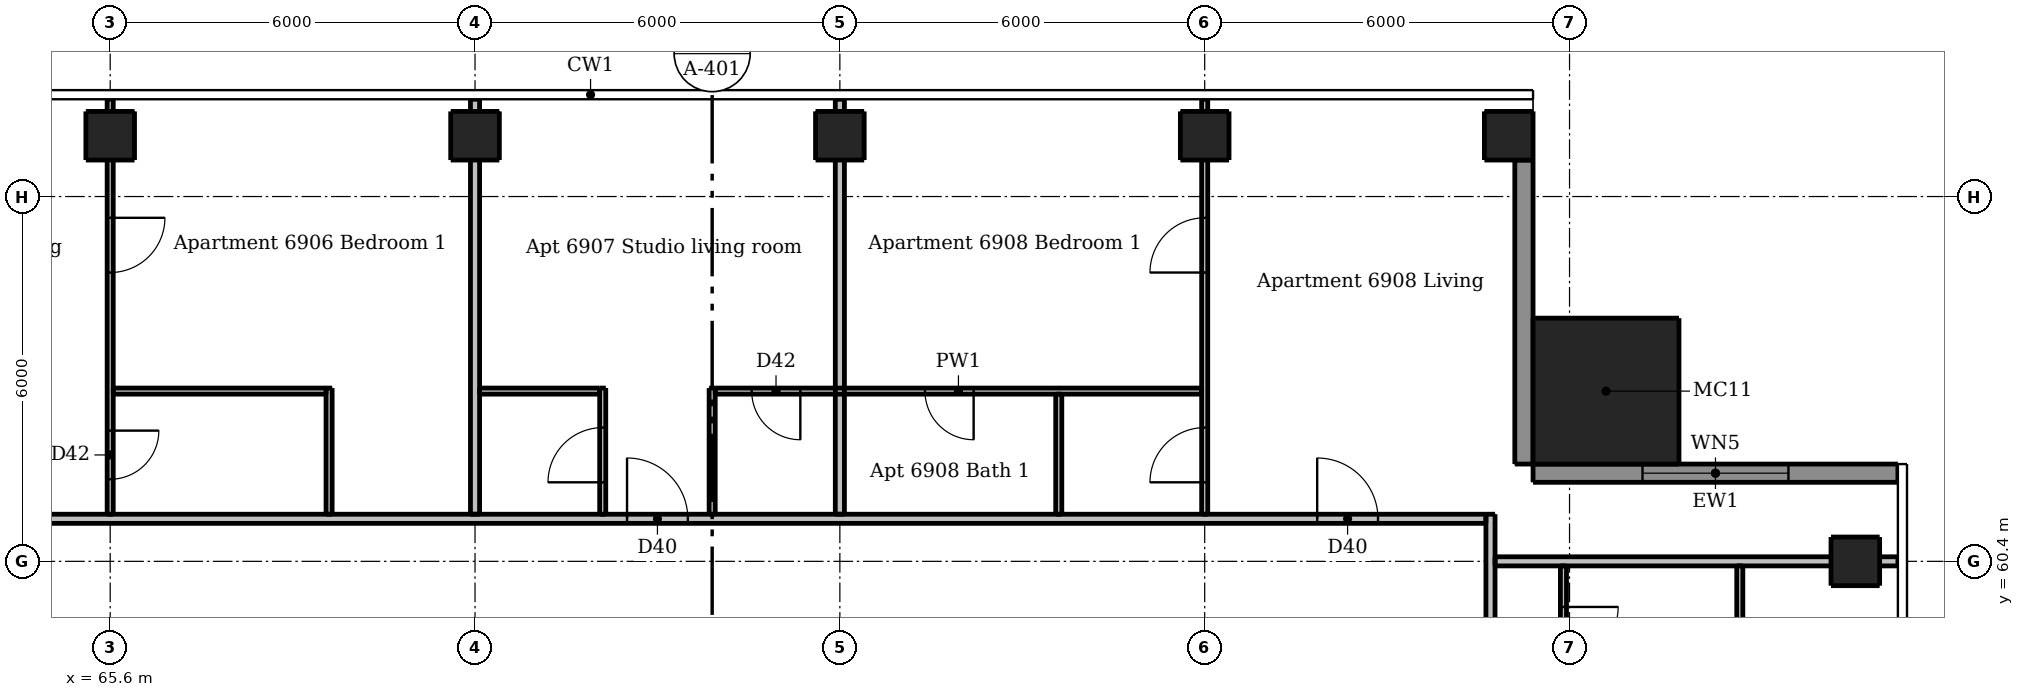
"""IFC4 building model, lengths in metres.
Left out: names, types, materials, properties, quantities, classifications, styles, units other than length and angle.
Written with IfcOpenShell. Run it as: python <this file> out.ifc"""

import sys

from ifc_helpers import new_model, si_unit, direction, frame, frame_2d, origin, origin_2d, place, context, subcontext, project, spatial, rectangle, extrude, element, fill, save


model = new_model("IFC4")
c1 = context("Model", 3, precision=1e-05, world=origin(), true_north=direction((0.0, 1.0)))
c2 = subcontext(c1, "Body", "Model", "MODEL_VIEW")
j1 = project(units=[si_unit("LENGTHUNIT", "METRE"), si_unit("PLANEANGLEUNIT", "RADIAN")], contexts=[c1])
p1 = place(None, origin())
s1 = spatial("IfcSite", under=j1, at=p1, CompositionType="ELEMENT")
p2 = place(p1, origin())
s2 = spatial("IfcBuilding", under=s1, at=p2, CompositionType="ELEMENT")
p3 = place(p2, frame((0.0, 0.0, 258.7)))
s3 = spatial("IfcBuildingStorey", under=s2, at=p3, CompositionType="ELEMENT", Elevation=258.7)
for number, where, z_axis, x_axis in (
    (1, (94.3, 60.4, 0.0), (0.0, 0.0, 1.0), (1.0, 0.0, 0.0)),
    (2, (65.6, 67.4, 0.0), (0.0, 0.0, 1.0), (1.0, 0.0, 0.0)),
    (3, (71.6, 67.4, 0.0), (0.0, 0.0, 1.0), (1.0, 0.0, 0.0)),
    (4, (77.6, 67.4, 0.0), (0.0, 0.0, 1.0), (1.0, 0.0, 0.0)),
    (5, (83.6, 67.4, 0.0), (0.0, 0.0, 1.0), (1.0, 0.0, 0.0)),
    (6, (88.6, 67.4, 0.0), (0.0, 0.0, 1.0), (1.0, 0.0, 0.0)),
):
    element("IfcColumn", number, at=place(p3, frame(where, z_axis=z_axis, x_axis=x_axis)), inside=s3, PredefinedType="COLUMN", context=c2, shape_type="SweptSolid", body=[
        extrude(rectangle(XDim=0.8, YDim=0.8, at=origin_2d()), origin(), (0.0, 0.0, 1.0), 3.05),
    ])
p4 = place(p3, frame((90.2, 63.2, 0.0), z_axis=(0.0, 0.0, 1.0), x_axis=(1.0, 0.0, 0.0)))
e7 = element("IfcColumn", 7, at=p4, inside=s3, PredefinedType="COLUMN", context=c2, shape_type="SweptSolid", body=[
    extrude(rectangle(XDim=2.4, YDim=2.4, at=origin_2d()), origin(), (0.0, 0.0, 1.0), 3.3),
])
p5 = place(p3, frame((95.0, 61.85, 0.0), z_axis=(0.0, 0.0, 1.0), x_axis=(-1.0, 0.0, 0.0)))
e8 = element("IfcWall", 8, at=p5, inside=s3, PredefinedType="SOLIDWALL", context=c2, shape_type="SweptSolid", body=[
    extrude(rectangle(XDim=6.0, YDim=0.3, at=frame_2d((3.0, 0.0))), origin(), (0.0, 0.0, 1.0), 3.05),
])
p6 = place(p5, frame((1.8, 0.0, 0.15)))
e9 = element("IfcOpeningElement", 9, at=p6, cuts=e8, PredefinedType="OPENING", context=c2, shape_type="SweptSolid", body=[
    extrude(rectangle(XDim=2.4, YDim=2.1, at=frame_2d((1.2, 1.05))), frame((0.0, 0.16, 0.0), z_axis=(0.0, -1.0, 0.0), x_axis=(1.0, 0.0, 0.0)), (0.0, 0.0, 1.0), 0.32),
])
p7 = place(p3, frame((88.85, 62.0, 0.0), z_axis=(0.0, 0.0, 1.0), x_axis=(0.0, 1.0, 0.0)))
e10 = element("IfcWall", 10, at=p7, inside=s3, PredefinedType="SOLIDWALL", context=c2, shape_type="SweptSolid", body=[
    extrude(rectangle(XDim=5.0, YDim=0.3, at=frame_2d((2.5, 0.0))), origin(), (0.0, 0.0, 1.0), 3.05),
])
p8 = place(p3, frame((65.6, 68.0, 0.0), z_axis=(0.0, 0.0, 1.0), x_axis=(0.0, -1.0, 0.0)))
e11 = element("IfcWall", 11, at=p8, inside=s3, PredefinedType="PARTITIONING", context=c2, shape_type="SweptSolid", body=[
    extrude(rectangle(XDim=6.825, YDim=0.1, at=frame_2d((3.413, 0.0))), origin(), (0.0, 0.0, 1.0), 2.516),
])
p9 = place(p8, frame((1.95, 0.0, 0.0)))
e12 = element("IfcOpeningElement", 12, at=p9, cuts=e11, PredefinedType="OPENING", context=c2, shape_type="SweptSolid", body=[
    extrude(rectangle(XDim=0.9, YDim=2.1, at=frame_2d((0.45, 1.05))), frame((0.0, 0.06, 0.0), z_axis=(0.0, -1.0, 0.0), x_axis=(1.0, 0.0, 0.0)), (0.0, 0.0, 1.0), 0.12),
])
p10 = place(p8, frame((5.45, 0.0, 0.0)))
e13 = element("IfcOpeningElement", 13, at=p10, cuts=e11, PredefinedType="OPENING", context=c2, shape_type="SweptSolid", body=[
    extrude(rectangle(XDim=0.8, YDim=2.1, at=frame_2d((0.4, 1.05))), frame((0.0, 0.06, 0.0), z_axis=(0.0, -1.0, 0.0), x_axis=(1.0, 0.0, 0.0)), (0.0, 0.0, 1.0), 0.12),
])
p11 = place(p3, frame((69.2, 61.175, 0.0), z_axis=(0.0, 0.0, 1.0), x_axis=(0.0, 1.0, 0.0)))
e14 = element("IfcWall", 14, at=p11, inside=s3, PredefinedType="PARTITIONING", context=c2, shape_type="SweptSolid", body=[
    extrude(rectangle(XDim=2.075, YDim=0.1, at=frame_2d((1.038, 0.0))), origin(), (0.0, 0.0, 1.0), 3.05),
])
p12 = place(p3, frame((73.7, 61.175, 0.0), z_axis=(0.0, 0.0, 1.0), x_axis=(0.0, 1.0, 0.0)))
e15 = element("IfcWall", 15, at=p12, inside=s3, PredefinedType="PARTITIONING", context=c2, shape_type="SweptSolid", body=[
    extrude(rectangle(XDim=2.075, YDim=0.1, at=frame_2d((1.038, 0.0))), origin(), (0.0, 0.0, 1.0), 3.05),
])
p13 = place(p12, frame((0.525, 0.0, 0.0)))
e16 = element("IfcOpeningElement", 16, at=p13, cuts=e15, PredefinedType="OPENING", context=c2, shape_type="SweptSolid", body=[
    extrude(rectangle(XDim=0.9, YDim=2.1, at=frame_2d((0.45, 1.05))), frame((0.0, 0.06, 0.0), z_axis=(0.0, -1.0, 0.0), x_axis=(1.0, 0.0, 0.0)), (0.0, 0.0, 1.0), 0.12),
])
p14 = place(p3, frame((75.5, 61.175, 0.0), z_axis=(0.0, 0.0, 1.0), x_axis=(0.0, 1.0, 0.0)))
e17 = element("IfcWall", 17, at=p14, inside=s3, PredefinedType="PARTITIONING", context=c2, shape_type="SweptSolid", body=[
    extrude(rectangle(XDim=2.075, YDim=0.1, at=frame_2d((1.038, 0.0))), origin(), (0.0, 0.0, 1.0), 3.05),
])
p15 = place(p3, frame((81.2, 61.175, 0.0), z_axis=(0.0, 0.0, 1.0), x_axis=(0.0, 1.0, 0.0)))
e18 = element("IfcWall", 18, at=p15, inside=s3, PredefinedType="PARTITIONING", context=c2, shape_type="SweptSolid", body=[
    extrude(rectangle(XDim=1.975, YDim=0.1, at=frame_2d((0.987, 0.0))), origin(), (0.0, 0.0, 1.0), 3.05),
])
p16 = place(p3, frame((83.6, 61.175, 0.0), z_axis=(0.0, 0.0, 1.0), x_axis=(0.0, 1.0, 0.0)))
e19 = element("IfcWall", 19, at=p16, inside=s3, PredefinedType="PARTITIONING", context=c2, shape_type="SweptSolid", body=[
    extrude(rectangle(XDim=6.825, YDim=0.1, at=frame_2d((3.413, 0.0))), origin(), (0.0, 0.0, 1.0), 2.516),
])
p17 = place(p16, frame((0.525, 0.0, 0.0)))
e20 = element("IfcOpeningElement", 20, at=p17, cuts=e19, PredefinedType="OPENING", context=c2, shape_type="SweptSolid", body=[
    extrude(rectangle(XDim=0.9, YDim=2.1, at=frame_2d((0.45, 1.05))), frame((0.0, 0.06, 0.0), z_axis=(0.0, -1.0, 0.0), x_axis=(1.0, 0.0, 0.0)), (0.0, 0.0, 1.0), 0.12),
])
p18 = place(p16, frame((3.975, 0.0, 0.0)))
e21 = element("IfcOpeningElement", 21, at=p18, cuts=e19, PredefinedType="OPENING", context=c2, shape_type="SweptSolid", body=[
    extrude(rectangle(XDim=0.9, YDim=2.1, at=frame_2d((0.45, 1.05))), frame((0.0, 0.06, 0.0), z_axis=(0.0, -1.0, 0.0), x_axis=(1.0, 0.0, 0.0)), (0.0, 0.0, 1.0), 0.12),
])
p19 = place(p3, frame((89.5, 60.325, 0.0), z_axis=(0.0, 0.0, 1.0), x_axis=(0.0, -1.0, 0.0)))
e22 = element("IfcWall", 22, at=p19, inside=s3, PredefinedType="PARTITIONING", context=c2, shape_type="SweptSolid", body=[
    extrude(rectangle(XDim=17.85, YDim=0.1, at=frame_2d((8.925, 0.0))), origin(), (0.0, 0.0, 1.0), 3.05),
])
p20 = place(p19, frame((4.575, 0.0, 0.0)))
e23 = element("IfcOpeningElement", 23, at=p20, cuts=e22, PredefinedType="OPENING", context=c2, shape_type="SweptSolid", body=[
    extrude(rectangle(XDim=0.9, YDim=2.1, at=frame_2d((0.45, 1.05))), frame((0.0, 0.06, 0.0), z_axis=(0.0, -1.0, 0.0), x_axis=(1.0, 0.0, 0.0)), (0.0, 0.0, 1.0), 0.12),
])
p21 = place(p19, frame((0.675, 0.0, 0.0)))
e24 = element("IfcOpeningElement", 24, at=p21, cuts=e22, PredefinedType="OPENING", context=c2, shape_type="SweptSolid", body=[
    extrude(rectangle(XDim=0.9, YDim=2.1, at=frame_2d((0.45, 1.05))), frame((0.0, 0.06, 0.0), z_axis=(0.0, -1.0, 0.0), x_axis=(1.0, 0.0, 0.0)), (0.0, 0.0, 1.0), 0.12),
])
p22 = place(p19, frame((2.775, 0.0, 0.0)))
e25 = element("IfcOpeningElement", 25, at=p22, cuts=e22, PredefinedType="OPENING", context=c2, shape_type="SweptSolid", body=[
    extrude(rectangle(XDim=0.9, YDim=2.1, at=frame_2d((0.45, 1.05))), frame((0.0, 0.06, 0.0), z_axis=(0.0, -1.0, 0.0), x_axis=(1.0, 0.0, 0.0)), (0.0, 0.0, 1.0), 0.12),
])
p23 = place(p19, frame((15.675, 0.0, 0.0)))
e26 = element("IfcOpeningElement", 26, at=p23, cuts=e22, PredefinedType="OPENING", context=c2, shape_type="SweptSolid", body=[
    extrude(rectangle(XDim=0.9, YDim=2.1, at=frame_2d((0.45, 1.05))), frame((0.0, 0.06, 0.0), z_axis=(0.0, -1.0, 0.0), x_axis=(1.0, 0.0, 0.0)), (0.0, 0.0, 1.0), 0.12),
])
p24 = place(p19, frame((9.675, 0.0, 0.0)))
e27 = element("IfcOpeningElement", 27, at=p24, cuts=e22, PredefinedType="OPENING", context=c2, shape_type="SweptSolid", body=[
    extrude(rectangle(XDim=0.9, YDim=2.1, at=frame_2d((0.45, 1.05))), frame((0.0, 0.06, 0.0), z_axis=(0.0, -1.0, 0.0), x_axis=(1.0, 0.0, 0.0)), (0.0, 0.0, 1.0), 0.12),
])
p25 = place(p19, frame((12.725, 0.0, 0.0)))
e28 = element("IfcOpeningElement", 28, at=p25, cuts=e22, PredefinedType="OPENING", context=c2, shape_type="SweptSolid", body=[
    extrude(rectangle(XDim=0.8, YDim=2.1, at=frame_2d((0.4, 1.05))), frame((0.0, 0.06, 0.0), z_axis=(0.0, -1.0, 0.0), x_axis=(1.0, 0.0, 0.0)), (0.0, 0.0, 1.0), 0.12),
])
p26 = place(p19, frame((6.725, 0.0, 0.0)))
e29 = element("IfcOpeningElement", 29, at=p26, cuts=e22, PredefinedType="OPENING", context=c2, shape_type="SweptSolid", body=[
    extrude(rectangle(XDim=0.8, YDim=2.1, at=frame_2d((0.4, 1.05))), frame((0.0, 0.06, 0.0), z_axis=(0.0, -1.0, 0.0), x_axis=(1.0, 0.0, 0.0)), (0.0, 0.0, 1.0), 0.12),
])
p27 = place(p3, frame((92.4, 56.15, 0.0), z_axis=(0.0, 0.0, 1.0), x_axis=(0.0, 1.0, 0.0)))
e30 = element("IfcWall", 30, at=p27, inside=s3, PredefinedType="PARTITIONING", context=c2, shape_type="SweptSolid", body=[
    extrude(rectangle(XDim=4.175, YDim=0.1, at=frame_2d((2.087, 0.0))), origin(), (0.0, 0.0, 1.0), 3.05),
])
p28 = place(p3, frame((65.65, 63.2, 0.0), z_axis=(0.0, 0.0, 1.0), x_axis=(1.0, 0.0, 0.0)))
e31 = element("IfcWall", 31, at=p28, inside=s3, PredefinedType="PARTITIONING", context=c2, shape_type="SweptSolid", body=[
    extrude(rectangle(XDim=3.5, YDim=0.1, at=frame_2d((1.75, 0.0))), origin(), (0.0, 0.0, 1.0), 3.05),
])
p29 = place(p3, frame((71.675, 63.2, 0.0), z_axis=(0.0, 0.0, 1.0), x_axis=(1.0, 0.0, 0.0)))
e32 = element("IfcWall", 32, at=p29, inside=s3, PredefinedType="PARTITIONING", context=c2, shape_type="SweptSolid", body=[
    extrude(rectangle(XDim=1.975, YDim=0.1, at=frame_2d((0.987, 0.0))), origin(), (0.0, 0.0, 1.0), 3.05),
])
p30 = place(p3, frame((83.55, 63.2, 0.0), z_axis=(0.0, 0.0, 1.0), x_axis=(-1.0, 0.0, 0.0)))
e33 = element("IfcWall", 33, at=p30, inside=s3, PredefinedType="PARTITIONING", context=c2, shape_type="SweptSolid", body=[
    extrude(rectangle(XDim=8.0, YDim=0.1, at=frame_2d((4.0, 0.0))), origin(), (0.0, 0.0, 1.0), 3.05),
])
p31 = place(p30, frame((6.6, 0.0, 0.0)))
e34 = element("IfcOpeningElement", 34, at=p31, cuts=e33, PredefinedType="OPENING", context=c2, shape_type="SweptSolid", body=[
    extrude(rectangle(XDim=0.8, YDim=2.1, at=frame_2d((0.4, 1.05))), frame((0.0, 0.06, 0.0), z_axis=(0.0, -1.0, 0.0), x_axis=(1.0, 0.0, 0.0)), (0.0, 0.0, 1.0), 0.12),
])
p32 = place(p30, frame((3.75, 0.0, 0.0)))
e35 = element("IfcOpeningElement", 35, at=p32, cuts=e33, PredefinedType="OPENING", context=c2, shape_type="SweptSolid", body=[
    extrude(rectangle(XDim=0.8, YDim=2.1, at=frame_2d((0.4, 1.05))), frame((0.0, 0.06, 0.0), z_axis=(0.0, -1.0, 0.0), x_axis=(1.0, 0.0, 0.0)), (0.0, 0.0, 1.0), 0.12),
])
for number, where, z_axis, x_axis in (
    (36, (71.6, 61.175, 0.0), (0.0, 0.0, 1.0), (0.0, 1.0, 0.0)),
    (37, (77.6, 61.175, 0.0), (0.0, 0.0, 1.0), (0.0, 1.0, 0.0)),
):
    element("IfcWall", number, at=place(p3, frame(where, z_axis=z_axis, x_axis=x_axis)), inside=s3, PredefinedType="PARTITIONING", context=c2, shape_type="SweptSolid", body=[
        extrude(rectangle(XDim=6.825, YDim=0.15, at=frame_2d((3.413, 0.0))), origin(), (0.0, 0.0, 1.0), 2.516),
    ])
p33 = place(p3, frame((88.3, 61.175, 0.0), z_axis=(0.0, 0.0, 1.0), x_axis=(0.0, -1.0, 0.0)))
e38 = element("IfcWall", 38, at=p33, inside=s3, PredefinedType="PARTITIONING", context=c2, shape_type="SweptSolid", body=[
    extrude(rectangle(XDim=29.4, YDim=0.15, at=frame_2d((14.7, 0.0))), origin(), (0.0, 0.0, 1.0), 3.05),
])
p34 = place(p33, frame((26.625, 0.0, 0.0)))
e39 = element("IfcOpeningElement", 39, at=p34, cuts=e38, PredefinedType="OPENING", context=c2, shape_type="SweptSolid", body=[
    extrude(rectangle(XDim=1.0, YDim=2.1, at=frame_2d((0.5, 1.05))), frame((0.0, 0.085, 0.0), z_axis=(0.0, -1.0, 0.0), x_axis=(1.0, 0.0, 0.0)), (0.0, 0.0, 1.0), 0.17),
])
p35 = place(p33, frame((9.275, 0.0, 0.0)))
e40 = element("IfcOpeningElement", 40, at=p35, cuts=e38, PredefinedType="OPENING", context=c2, shape_type="SweptSolid", body=[
    extrude(rectangle(XDim=1.0, YDim=2.1, at=frame_2d((0.5, 1.05))), frame((0.0, 0.085, 0.0), z_axis=(0.0, -1.0, 0.0), x_axis=(1.0, 0.0, 0.0)), (0.0, 0.0, 1.0), 0.17),
])
p36 = place(p3, frame((58.975, 61.1, 0.0), z_axis=(0.0, 0.0, 1.0), x_axis=(1.0, 0.0, 0.0)))
e41 = element("IfcWall", 41, at=p36, inside=s3, PredefinedType="PARTITIONING", context=c2, shape_type="SweptSolid", body=[
    extrude(rectangle(XDim=29.25, YDim=0.15, at=frame_2d((14.625, 0.0))), origin(), (0.0, 0.0, 1.0), 3.05),
])
p37 = place(p36, frame((4.325, 0.0, 0.0)))
e42 = element("IfcOpeningElement", 42, at=p37, cuts=e41, PredefinedType="OPENING", context=c2, shape_type="SweptSolid", body=[
    extrude(rectangle(XDim=1.0, YDim=2.1, at=frame_2d((0.5, 1.05))), frame((0.0, 0.085, 0.0), z_axis=(0.0, -1.0, 0.0), x_axis=(1.0, 0.0, 0.0)), (0.0, 0.0, 1.0), 0.17),
])
p38 = place(p36, frame((15.125, 0.0, 0.0)))
e43 = element("IfcOpeningElement", 43, at=p38, cuts=e41, PredefinedType="OPENING", context=c2, shape_type="SweptSolid", body=[
    extrude(rectangle(XDim=1.0, YDim=2.1, at=frame_2d((0.5, 1.05))), frame((0.0, 0.085, 0.0), z_axis=(0.0, -1.0, 0.0), x_axis=(1.0, 0.0, 0.0)), (0.0, 0.0, 1.0), 0.17),
])
p39 = place(p36, frame((26.475, 0.0, 0.0)))
e44 = element("IfcOpeningElement", 44, at=p39, cuts=e41, PredefinedType="OPENING", context=c2, shape_type="SweptSolid", body=[
    extrude(rectangle(XDim=1.0, YDim=2.1, at=frame_2d((0.5, 1.05))), frame((0.0, 0.085, 0.0), z_axis=(0.0, -1.0, 0.0), x_axis=(1.0, 0.0, 0.0)), (0.0, 0.0, 1.0), 0.17),
])
p40 = place(p3, frame((88.375, 60.4, 0.0), z_axis=(0.0, 0.0, 1.0), x_axis=(1.0, 0.0, 0.0)))
e45 = element("IfcWall", 45, at=p40, inside=s3, PredefinedType="PARTITIONING", context=c2, shape_type="SweptSolid", body=[
    extrude(rectangle(XDim=6.625, YDim=0.15, at=frame_2d((3.312, 0.0))), origin(), (0.0, 0.0, 1.0), 2.647),
])
p41 = place(p6, origin())
e46 = element("IfcWindow", 46, at=p41, inside=s3, PartitioningType="DOUBLE_PANEL_VERTICAL", PredefinedType="WINDOW", context=c2, shape_type="SweptSolid", body=[
    extrude(rectangle(XDim=2.4, YDim=2.1, at=frame_2d((1.2, 1.05))), frame((0.0, 0.03, 0.0), z_axis=(0.0, -1.0, 0.0), x_axis=(1.0, 0.0, 0.0)), (0.0, 0.0, 1.0), 0.06),
])
fill(e9, e46)
p42 = place(p21, origin())
e47 = element("IfcDoor", 47, at=p42, inside=s3, OperationType="SINGLE_SWING_LEFT", PredefinedType="DOOR", context=c2, shape_type="SweptSolid", body=[
    extrude(rectangle(XDim=0.9, YDim=2.1, at=frame_2d((0.45, 1.05))), frame((0.0, 0.025, 0.0), z_axis=(0.0, -1.0, 0.0), x_axis=(1.0, 0.0, 0.0)), (0.0, 0.0, 1.0), 0.05),
])
fill(e24, e47)
p43 = place(p9, origin())
e48 = element("IfcDoor", 48, at=p43, inside=s3, OperationType="SINGLE_SWING_LEFT", PredefinedType="DOOR", context=c2, shape_type="SweptSolid", body=[
    extrude(rectangle(XDim=0.9, YDim=2.1, at=frame_2d((0.45, 1.05))), frame((0.0, 0.025, 0.0), z_axis=(0.0, -1.0, 0.0), x_axis=(1.0, 0.0, 0.0)), (0.0, 0.0, 1.0), 0.05),
])
fill(e12, e48)
p44 = place(p10, origin())
e49 = element("IfcDoor", 49, at=p44, inside=s3, OperationType="SINGLE_SWING_LEFT", PredefinedType="DOOR", context=c2, shape_type="SweptSolid", body=[
    extrude(rectangle(XDim=0.8, YDim=2.1, at=frame_2d((0.4, 1.05))), frame((0.0, 0.025, 0.0), z_axis=(0.0, -1.0, 0.0), x_axis=(1.0, 0.0, 0.0)), (0.0, 0.0, 1.0), 0.05),
])
fill(e13, e49)
p45 = place(p38, origin())
e50 = element("IfcDoor", 50, at=p45, inside=s3, OperationType="SINGLE_SWING_LEFT", PredefinedType="DOOR", context=c2, shape_type="SweptSolid", body=[
    extrude(rectangle(XDim=1.0, YDim=2.1, at=frame_2d((0.5, 1.05))), frame((0.0, 0.025, 0.0), z_axis=(0.0, -1.0, 0.0), x_axis=(1.0, 0.0, 0.0)), (0.0, 0.0, 1.0), 0.05),
])
fill(e43, e50)
p46 = place(p13, origin())
e51 = element("IfcDoor", 51, at=p46, inside=s3, OperationType="SINGLE_SWING_LEFT", PredefinedType="DOOR", context=c2, shape_type="SweptSolid", body=[
    extrude(rectangle(XDim=0.9, YDim=2.1, at=frame_2d((0.45, 1.05))), frame((0.0, 0.025, 0.0), z_axis=(0.0, -1.0, 0.0), x_axis=(1.0, 0.0, 0.0)), (0.0, 0.0, 1.0), 0.05),
])
fill(e16, e51)
p47 = place(p31, origin())
e52 = element("IfcDoor", 52, at=p47, inside=s3, OperationType="SINGLE_SWING_LEFT", PredefinedType="DOOR", context=c2, shape_type="SweptSolid", body=[
    extrude(rectangle(XDim=0.8, YDim=2.1, at=frame_2d((0.4, 1.05))), frame((0.0, 0.025, 0.0), z_axis=(0.0, -1.0, 0.0), x_axis=(1.0, 0.0, 0.0)), (0.0, 0.0, 1.0), 0.05),
])
fill(e34, e52)
p48 = place(p39, origin())
e53 = element("IfcDoor", 53, at=p48, inside=s3, OperationType="SINGLE_SWING_LEFT", PredefinedType="DOOR", context=c2, shape_type="SweptSolid", body=[
    extrude(rectangle(XDim=1.0, YDim=2.1, at=frame_2d((0.5, 1.05))), frame((0.0, 0.025, 0.0), z_axis=(0.0, -1.0, 0.0), x_axis=(1.0, 0.0, 0.0)), (0.0, 0.0, 1.0), 0.05),
])
fill(e44, e53)
p49 = place(p17, origin())
e54 = element("IfcDoor", 54, at=p49, inside=s3, OperationType="SINGLE_SWING_LEFT", PredefinedType="DOOR", context=c2, shape_type="SweptSolid", body=[
    extrude(rectangle(XDim=0.9, YDim=2.1, at=frame_2d((0.45, 1.05))), frame((0.0, 0.025, 0.0), z_axis=(0.0, -1.0, 0.0), x_axis=(1.0, 0.0, 0.0)), (0.0, 0.0, 1.0), 0.05),
])
fill(e20, e54)
p50 = place(p18, origin())
e55 = element("IfcDoor", 55, at=p50, inside=s3, OperationType="SINGLE_SWING_LEFT", PredefinedType="DOOR", context=c2, shape_type="SweptSolid", body=[
    extrude(rectangle(XDim=0.9, YDim=2.1, at=frame_2d((0.45, 1.05))), frame((0.0, 0.025, 0.0), z_axis=(0.0, -1.0, 0.0), x_axis=(1.0, 0.0, 0.0)), (0.0, 0.0, 1.0), 0.05),
])
fill(e21, e55)
p51 = place(p32, origin())
e56 = element("IfcDoor", 56, at=p51, inside=s3, OperationType="SINGLE_SWING_LEFT", PredefinedType="DOOR", context=c2, shape_type="SweptSolid", body=[
    extrude(rectangle(XDim=0.8, YDim=2.1, at=frame_2d((0.4, 1.05))), frame((0.0, 0.025, 0.0), z_axis=(0.0, -1.0, 0.0), x_axis=(1.0, 0.0, 0.0)), (0.0, 0.0, 1.0), 0.05),
])
fill(e35, e56)
save(model, sys.argv[1])
